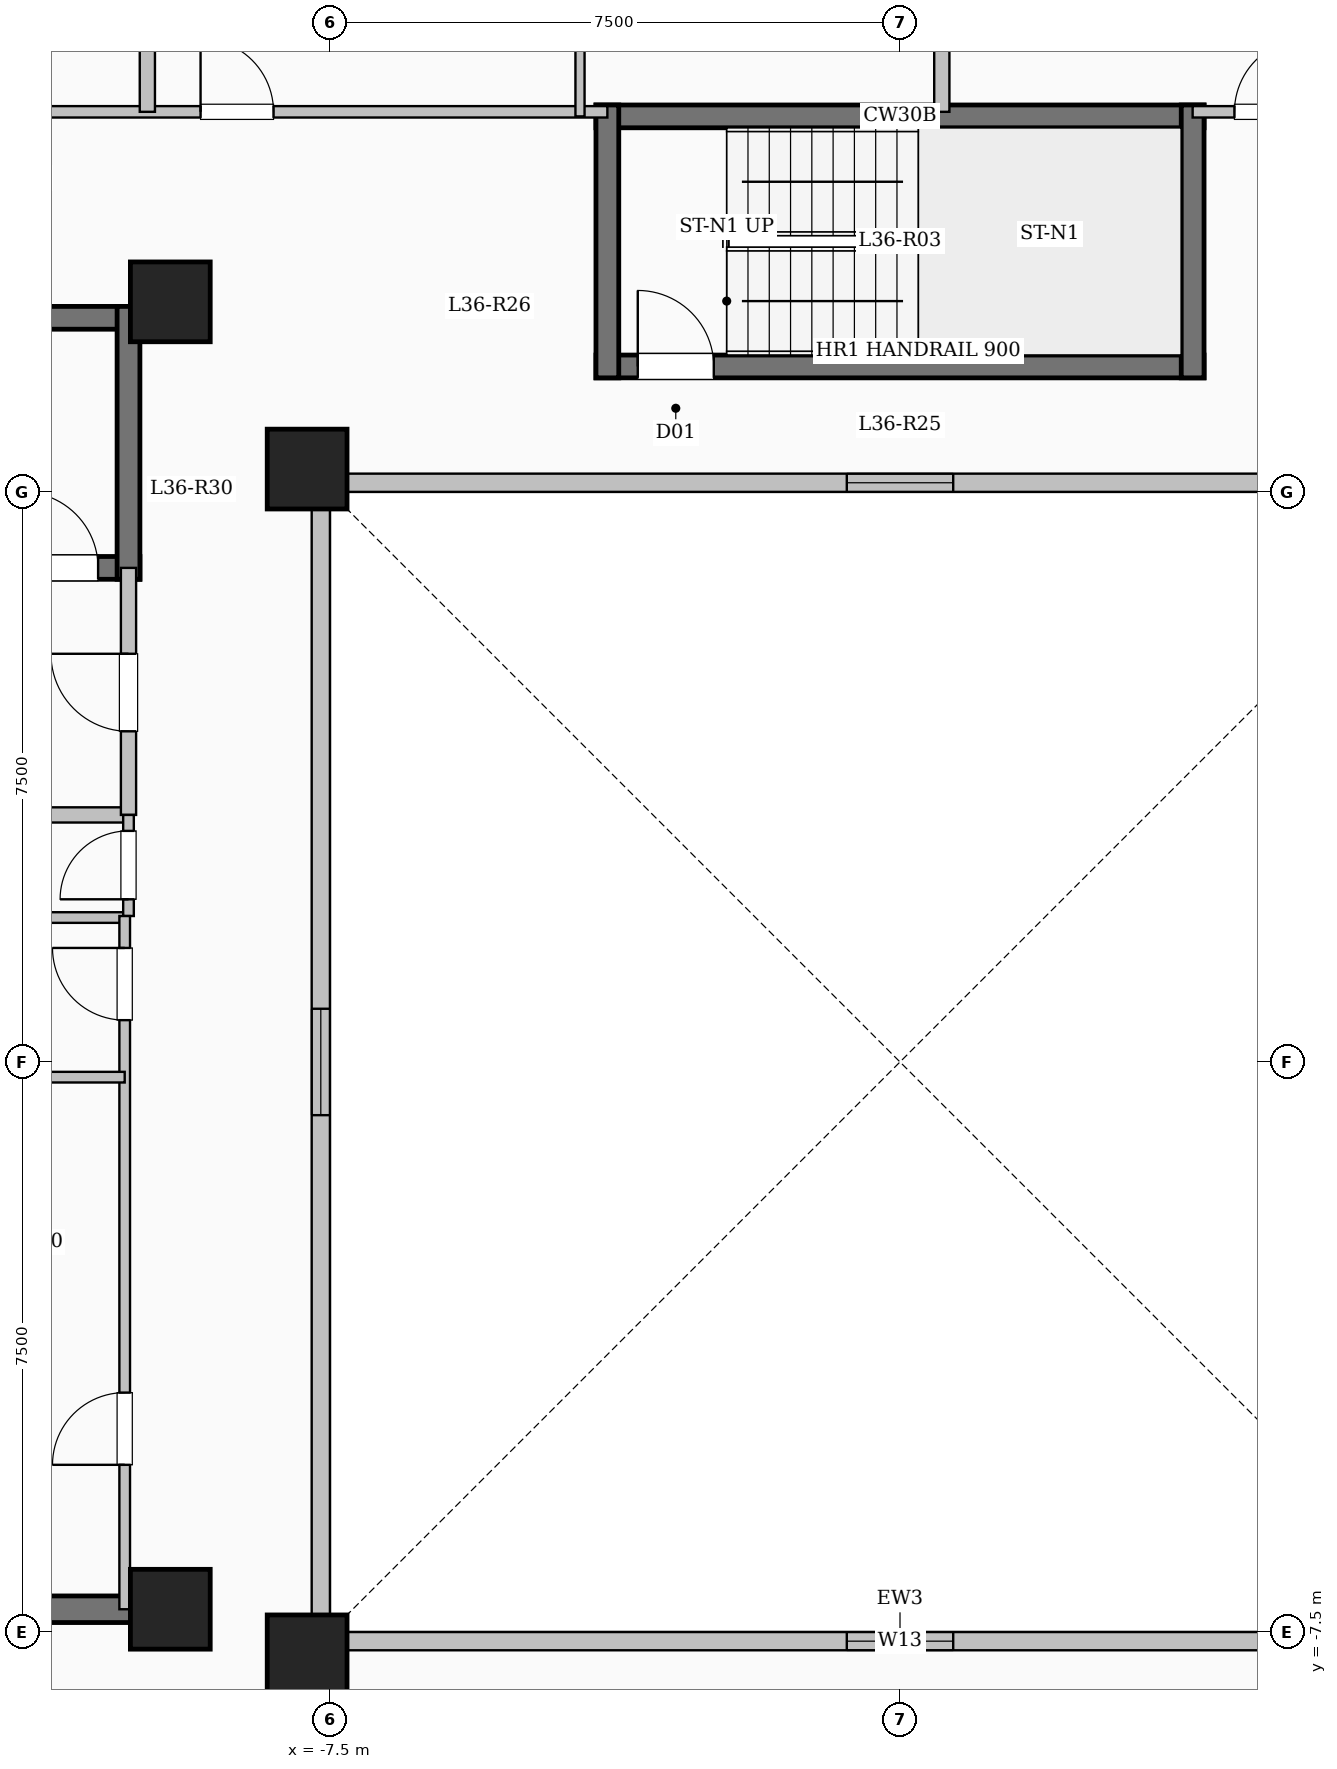
"""IFC4 building model, lengths in metres.
Left out: names, types, materials, properties, quantities, classifications, styles, units other than length and angle.
Written with IfcOpenShell. Run it as: python <this file> out.ifc"""

import sys

from ifc_helpers import new_model, si_unit, direction, frame, frame_2d, origin, origin_2d, place, context, subcontext, project, spatial, rectangle, extrude, element, fill, save


model = new_model("IFC4")
c1 = context("Model", 3, precision=1e-05, world=origin(), true_north=direction((0.0, 1.0)))
c2 = subcontext(c1, "Body", "Model", "MODEL_VIEW")
j1 = project(units=[si_unit("LENGTHUNIT", "METRE"), si_unit("PLANEANGLEUNIT", "RADIAN")], contexts=[c1])
p1 = place(None, origin())
s1 = spatial("IfcSite", under=j1, at=p1, CompositionType="ELEMENT")
p2 = place(p1, origin())
s2 = spatial("IfcBuilding", under=s1, at=p2, CompositionType="ELEMENT")
p3 = place(p2, frame((0.0, 0.0, 135.95)))
s3 = spatial("IfcBuildingStorey", under=s2, at=p3, CompositionType="ELEMENT", Elevation=135.95)
for number, where, z_axis, x_axis in (
    (1, (-7.8, -7.8, 0.0), (0.0, 0.0, 1.0), (1.0, 0.0, 0.0)),
    (2, (-7.8, 7.8, 0.0), (0.0, 0.0, 1.0), (1.0, 0.0, 0.0)),
    (3, (-9.6, -7.2, 0.0), (0.0, 0.0, 1.0), (1.0, 0.0, 0.0)),
    (4, (-9.6, 10.0, 0.0), (0.0, 0.0, 1.0), (1.0, 0.0, 0.0)),
):
    element("IfcColumn", number, at=place(p3, frame(where, z_axis=z_axis, x_axis=x_axis)), inside=s3, PredefinedType="COLUMN", context=c2, shape_type="SweptSolid", body=[
        extrude(rectangle(XDim=1.05, YDim=1.05, at=origin_2d()), origin(), (0.0, 0.0, 1.0), 3.35),
    ])
p4 = place(p3, frame((-7.62, -7.62, 0.0), z_axis=(0.0, 0.0, 1.0), x_axis=(1.0, 0.0, 0.0)))
e5 = element("IfcWall", 5, at=p4, inside=s3, PredefinedType="SOLIDWALL", context=c2, shape_type="SweptSolid", body=[
    extrude(rectangle(XDim=15.24, YDim=0.24, at=frame_2d((7.62, 0.0))), origin(), (0.0, 0.0, 1.0), 3.1),
])
p5 = place(p4, frame((6.92, 0.0, 0.95)))
e6 = element("IfcOpeningElement", 6, at=p5, cuts=e5, PredefinedType="OPENING", context=c2, shape_type="SweptSolid", body=[
    extrude(rectangle(XDim=1.4, YDim=1.5, at=frame_2d((0.7, 0.75))), frame((0.0, 0.13, 0.0), z_axis=(0.0, -1.0, 0.0), x_axis=(1.0, 0.0, 0.0)), (0.0, 0.0, 1.0), 0.26),
])
p6 = place(p3, frame((7.62, 7.62, 0.0), z_axis=(0.0, 0.0, 1.0), x_axis=(-1.0, 0.0, 0.0)))
e7 = element("IfcWall", 7, at=p6, inside=s3, PredefinedType="SOLIDWALL", context=c2, shape_type="SweptSolid", body=[
    extrude(rectangle(XDim=15.24, YDim=0.24, at=frame_2d((7.62, 0.0))), origin(), (0.0, 0.0, 1.0), 3.1),
])
p7 = place(p6, frame((6.92, 0.0, 0.95)))
e8 = element("IfcOpeningElement", 8, at=p7, cuts=e7, PredefinedType="OPENING", context=c2, shape_type="SweptSolid", body=[
    extrude(rectangle(XDim=1.4, YDim=1.5, at=frame_2d((0.7, 0.75))), frame((0.0, 0.13, 0.0), z_axis=(0.0, -1.0, 0.0), x_axis=(1.0, 0.0, 0.0)), (0.0, 0.0, 1.0), 0.26),
])
p8 = place(p3, frame((-7.62, 7.62, 0.0), z_axis=(0.0, 0.0, 1.0), x_axis=(0.0, -1.0, 0.0)))
e9 = element("IfcWall", 9, at=p8, inside=s3, PredefinedType="SOLIDWALL", context=c2, shape_type="SweptSolid", body=[
    extrude(rectangle(XDim=15.24, YDim=0.24, at=frame_2d((7.62, 0.0))), origin(), (0.0, 0.0, 1.0), 3.1),
])
p9 = place(p8, frame((6.92, 0.0, 0.95)))
e10 = element("IfcOpeningElement", 10, at=p9, cuts=e9, PredefinedType="OPENING", context=c2, shape_type="SweptSolid", body=[
    extrude(rectangle(XDim=1.4, YDim=1.5, at=frame_2d((0.7, 0.75))), frame((0.0, 0.13, 0.0), z_axis=(0.0, -1.0, 0.0), x_axis=(1.0, 0.0, 0.0)), (0.0, 0.0, 1.0), 0.26),
])
p10 = place(p3, frame((-18.0, 9.79, 0.0), z_axis=(0.0, 0.0, 1.0), x_axis=(1.0, 0.0, 0.0)))
e11 = element("IfcWall", 11, at=p10, inside=s3, PredefinedType="SHEAR", context=c2, shape_type="SweptSolid", body=[
    extrude(rectangle(XDim=8.0, YDim=0.3, at=frame_2d((4.0, 0.0))), origin(), (0.0, 0.0, 1.0), 3.35),
])
p11 = place(p3, frame((-18.0, 6.5, 0.0), z_axis=(0.0, 0.0, 1.0), x_axis=(1.0, 0.0, 0.0)))
e12 = element("IfcWall", 12, at=p11, inside=s3, PredefinedType="SHEAR", context=c2, shape_type="SweptSolid", body=[
    extrude(rectangle(XDim=8.0, YDim=0.3, at=frame_2d((4.0, 0.0))), origin(), (0.0, 0.0, 1.0), 3.35),
])
p12 = place(p11, frame((6.45, 0.0, 0.0)))
e13 = element("IfcOpeningElement", 13, at=p12, cuts=e12, PredefinedType="OPENING", context=c2, shape_type="SweptSolid", body=[
    extrude(rectangle(XDim=1.0, YDim=2.15, at=frame_2d((0.5, 1.075))), frame((0.0, 0.16, 0.0), z_axis=(0.0, -1.0, 0.0), x_axis=(1.0, 0.0, 0.0)), (0.0, 0.0, 1.0), 0.32),
])
p13 = place(p3, frame((-10.15, 6.35, 0.0), z_axis=(0.0, 0.0, 1.0), x_axis=(0.0, 1.0, 0.0)))
e14 = element("IfcWall", 14, at=p13, inside=s3, PredefinedType="SHEAR", context=c2, shape_type="SweptSolid", body=[
    extrude(rectangle(XDim=3.59, YDim=0.3, at=frame_2d((1.795, 0.0))), origin(), (0.0, 0.0, 1.0), 3.35),
])
p14 = place(p3, frame((-4.0, 12.44, 0.0), z_axis=(0.0, 0.0, 1.0), x_axis=(1.0, 0.0, 0.0)))
e15 = element("IfcWall", 15, at=p14, inside=s3, PredefinedType="SHEAR", context=c2, shape_type="SweptSolid", body=[
    extrude(rectangle(XDim=8.0, YDim=0.3, at=frame_2d((4.0, 0.0))), origin(), (0.0, 0.0, 1.0), 3.35),
])
p15 = place(p3, frame((-4.0, 9.15, 0.0), z_axis=(0.0, 0.0, 1.0), x_axis=(1.0, 0.0, 0.0)))
e16 = element("IfcWall", 16, at=p15, inside=s3, PredefinedType="SHEAR", context=c2, shape_type="SweptSolid", body=[
    extrude(rectangle(XDim=8.0, YDim=0.3, at=frame_2d((4.0, 0.0))), origin(), (0.0, 0.0, 1.0), 3.35),
])
p16 = place(p15, frame((0.55, 0.0, 0.0)))
e17 = element("IfcOpeningElement", 17, at=p16, cuts=e16, PredefinedType="OPENING", context=c2, shape_type="SweptSolid", body=[
    extrude(rectangle(XDim=1.0, YDim=2.15, at=frame_2d((0.5, 1.075))), frame((0.0, 0.16, 0.0), z_axis=(0.0, -1.0, 0.0), x_axis=(1.0, 0.0, 0.0)), (0.0, 0.0, 1.0), 0.32),
])
for number, where, z_axis, x_axis in (
    (18, (-3.85, 9.0, 0.0), (0.0, 0.0, 1.0), (0.0, 1.0, 0.0)),
    (19, (3.85, 9.0, 0.0), (0.0, 0.0, 1.0), (0.0, 1.0, 0.0)),
):
    element("IfcWall", number, at=place(p3, frame(where, z_axis=z_axis, x_axis=x_axis)), inside=s3, PredefinedType="SHEAR", context=c2, shape_type="SweptSolid", body=[
        extrude(rectangle(XDim=3.59, YDim=0.3, at=frame_2d((1.795, 0.0))), origin(), (0.0, 0.0, 1.0), 3.35),
    ])
p17 = place(p3, frame((-15.55, 3.25, 0.0), z_axis=(0.0, 0.0, 1.0), x_axis=(1.0, 0.0, 0.0)))
e20 = element("IfcWall", 20, at=p17, inside=s3, PredefinedType="SOLIDWALL", context=c2, shape_type="SweptSolid", body=[
    extrude(rectangle(XDim=5.4, YDim=0.2, at=frame_2d((2.7, 0.0))), origin(), (0.0, 0.0, 1.0), 3.1),
])
p18 = place(p3, frame((-10.15, 3.25, 0.0), z_axis=(0.0, 0.0, 1.0), x_axis=(0.0, 1.0, 0.0)))
e21 = element("IfcWall", 21, at=p18, inside=s3, PredefinedType="SOLIDWALL", context=c2, shape_type="SweptSolid", body=[
    extrude(rectangle(XDim=3.25, YDim=0.2, at=frame_2d((1.625, 0.0))), origin(), (0.0, 0.0, 1.0), 3.1),
])
p19 = place(p18, frame((1.1, 0.0, 0.0)))
e22 = element("IfcOpeningElement", 22, at=p19, cuts=e21, PredefinedType="OPENING", context=c2, shape_type="SweptSolid", body=[
    extrude(rectangle(XDim=1.02, YDim=2.15, at=frame_2d((0.51, 1.075))), frame((0.0, 0.11, 0.0), z_axis=(0.0, -1.0, 0.0), x_axis=(1.0, 0.0, 0.0)), (0.0, 0.0, 1.0), 0.22),
])
p20 = place(p3, frame((-18.625, -7.2, 0.0), z_axis=(0.0, 0.0, 1.0), x_axis=(1.0, 0.0, 0.0)))
e23 = element("IfcWall", 23, at=p20, inside=s3, PredefinedType="SHEAR", context=c2, shape_type="SweptSolid", body=[
    extrude(rectangle(XDim=8.55, YDim=0.35, at=frame_2d((4.275, 0.0))), origin(), (0.0, 0.0, 1.0), 3.35),
])
p21 = place(p3, frame((-12.95, 1.9, 0.0), z_axis=(0.0, 0.0, 1.0), x_axis=(1.0, 0.0, 0.0)))
e24 = element("IfcWall", 24, at=p21, inside=s3, PredefinedType="PARTITIONING", context=c2, shape_type="SweptSolid", body=[
    extrude(rectangle(XDim=2.8, YDim=0.14, at=frame_2d((1.4, 0.0))), origin(), (0.0, 0.0, 1.0), 3.1),
])
p22 = place(p3, frame((-10.15, 1.92, 0.0), z_axis=(0.0, 0.0, 1.0), x_axis=(0.0, 1.0, 0.0)))
e25 = element("IfcWall", 25, at=p22, inside=s3, PredefinedType="PARTITIONING", context=c2, shape_type="SweptSolid", body=[
    extrude(rectangle(XDim=1.33, YDim=0.14, at=frame_2d((0.665, 0.0))), origin(), (0.0, 0.0, 1.0), 3.1),
])
p23 = place(p22, frame((0.22, 0.0, 0.0)))
e26 = element("IfcOpeningElement", 26, at=p23, cuts=e25, PredefinedType="OPENING", context=c2, shape_type="SweptSolid", body=[
    extrude(rectangle(XDim=0.9, YDim=2.08, at=frame_2d((0.45, 1.04))), frame((0.0, 0.08, 0.0), z_axis=(0.0, -1.0, 0.0), x_axis=(1.0, 0.0, 0.0)), (0.0, 0.0, 1.0), 0.16),
])
p24 = place(p3, frame((-10.2, -7.2, 0.0), z_axis=(0.0, 0.0, 1.0), x_axis=(0.0, 1.0, 0.0)))
e27 = element("IfcWall", 27, at=p24, inside=s3, PredefinedType="PARTITIONING", context=c2, shape_type="SweptSolid", body=[
    extrude(rectangle(XDim=9.12, YDim=0.14, at=frame_2d((4.56, 0.0))), origin(), (0.0, 0.0, 1.0), 3.1),
])
p25 = place(p24, frame((1.9, 0.0, 0.0)))
e28 = element("IfcOpeningElement", 28, at=p25, cuts=e27, PredefinedType="OPENING", context=c2, shape_type="SweptSolid", body=[
    extrude(rectangle(XDim=0.95, YDim=2.12, at=frame_2d((0.475, 1.06))), frame((0.0, 0.08, 0.0), z_axis=(0.0, -1.0, 0.0), x_axis=(1.0, 0.0, 0.0)), (0.0, 0.0, 1.0), 0.16),
])
p26 = place(p24, frame((7.75, 0.0, 0.0)))
e29 = element("IfcOpeningElement", 29, at=p26, cuts=e27, PredefinedType="OPENING", context=c2, shape_type="SweptSolid", body=[
    extrude(rectangle(XDim=0.95, YDim=2.12, at=frame_2d((0.475, 1.06))), frame((0.0, 0.08, 0.0), z_axis=(0.0, -1.0, 0.0), x_axis=(1.0, 0.0, 0.0)), (0.0, 0.0, 1.0), 0.16),
])
p27 = place(p3, frame((-12.9, -0.2, 0.0), z_axis=(0.0, 0.0, 1.0), x_axis=(1.0, 0.0, 0.0)))
e30 = element("IfcWall", 30, at=p27, inside=s3, PredefinedType="PARTITIONING", context=c2, shape_type="SweptSolid", body=[
    extrude(rectangle(XDim=2.7, YDim=0.14, at=frame_2d((1.35, 0.0))), origin(), (0.0, 0.0, 1.0), 3.1),
])
p28 = place(p3, frame((-19.55, 12.5, 0.0), z_axis=(0.0, 0.0, 1.0), x_axis=(1.0, 0.0, 0.0)))
e31 = element("IfcWall", 31, at=p28, inside=s3, PredefinedType="PARTITIONING", context=c2, shape_type="SweptSolid", body=[
    extrude(rectangle(XDim=15.7, YDim=0.15, at=frame_2d((7.85, 0.0))), origin(), (0.0, 0.0, 1.0), 3.1),
])
p29 = place(p28, frame((0.7, 0.0, 0.0)))
e32 = element("IfcOpeningElement", 32, at=p29, cuts=e31, PredefinedType="OPENING", context=c2, shape_type="SweptSolid", body=[
    extrude(rectangle(XDim=0.96, YDim=2.15, at=frame_2d((0.48, 1.075))), frame((0.0, 0.085, 0.0), z_axis=(0.0, -1.0, 0.0), x_axis=(1.0, 0.0, 0.0)), (0.0, 0.0, 1.0), 0.17),
])
p30 = place(p28, frame((10.348, 0.0, 0.0)))
e33 = element("IfcOpeningElement", 33, at=p30, cuts=e31, PredefinedType="OPENING", context=c2, shape_type="SweptSolid", body=[
    extrude(rectangle(XDim=0.96, YDim=2.15, at=frame_2d((0.48, 1.075))), frame((0.0, 0.085, 0.0), z_axis=(0.0, -1.0, 0.0), x_axis=(1.0, 0.0, 0.0)), (0.0, 0.0, 1.0), 0.17),
])
p31 = place(p3, frame((3.85, 12.5, 0.0), z_axis=(0.0, 0.0, 1.0), x_axis=(1.0, 0.0, 0.0)))
e34 = element("IfcWall", 34, at=p31, inside=s3, PredefinedType="PARTITIONING", context=c2, shape_type="SweptSolid", body=[
    extrude(rectangle(XDim=15.7, YDim=0.15, at=frame_2d((7.85, 0.0))), origin(), (0.0, 0.0, 1.0), 3.1),
])
p32 = place(p31, frame((0.55, 0.0, 0.0)))
e35 = element("IfcOpeningElement", 35, at=p32, cuts=e34, PredefinedType="OPENING", context=c2, shape_type="SweptSolid", body=[
    extrude(rectangle(XDim=0.96, YDim=2.15, at=frame_2d((0.48, 1.075))), frame((0.0, 0.085, 0.0), z_axis=(0.0, -1.0, 0.0), x_axis=(1.0, 0.0, 0.0)), (0.0, 0.0, 1.0), 0.17),
])
p33 = place(p31, frame((7.28, 0.0, 0.0)))
e36 = element("IfcOpeningElement", 36, at=p33, cuts=e34, PredefinedType="OPENING", context=c2, shape_type="SweptSolid", body=[
    extrude(rectangle(XDim=0.96, YDim=2.15, at=frame_2d((0.48, 1.075))), frame((0.0, 0.085, 0.0), z_axis=(0.0, -1.0, 0.0), x_axis=(1.0, 0.0, 0.0)), (0.0, 0.0, 1.0), 0.17),
])
p34 = place(p3, frame((0.55, 12.5, 0.0), z_axis=(0.0, 0.0, 1.0), x_axis=(0.0, 1.0, 0.0)))
e37 = element("IfcWall", 37, at=p34, inside=s3, PredefinedType="SOLIDWALL", context=c2, shape_type="SweptSolid", body=[
    extrude(rectangle(XDim=10.18, YDim=0.2, at=frame_2d((5.09, 0.0))), origin(), (0.0, 0.0, 1.0), 3.1),
])
p35 = place(p3, frame((-9.902, 12.5, 0.0), z_axis=(0.0, 0.0, 1.0), x_axis=(0.0, 1.0, 0.0)))
e38 = element("IfcWall", 38, at=p35, inside=s3, PredefinedType="SOLIDWALL", context=c2, shape_type="SweptSolid", body=[
    extrude(rectangle(XDim=8.971, YDim=0.2, at=frame_2d((4.485, 0.0))), origin(), (0.0, 0.0, 1.0), 3.1),
])
p36 = place(p3, frame((-4.21, 12.44, 0.0), z_axis=(0.0, 0.0, 1.0), x_axis=(0.0, 1.0, 0.0)))
e39 = element("IfcWall", 39, at=p36, inside=s3, PredefinedType="PARTITIONING", context=c2, shape_type="SweptSolid", body=[
    extrude(rectangle(XDim=3.21, YDim=0.12, at=frame_2d((1.605, 0.0))), origin(), (0.0, 0.0, 1.0), 3.1),
])
p37 = place(p36, frame((1.195, 0.0, 0.0)))
e40 = element("IfcOpeningElement", 40, at=p37, cuts=e39, PredefinedType="OPENING", context=c2, shape_type="SweptSolid", body=[
    extrude(rectangle(XDim=0.88, YDim=2.1, at=frame_2d((0.44, 1.05))), frame((0.0, 0.07, 0.0), z_axis=(0.0, -1.0, 0.0), x_axis=(1.0, 0.0, 0.0)), (0.0, 0.0, 1.0), 0.14),
])
p38 = place(p5, origin())
e41 = element("IfcWindow", 41, at=p38, inside=s3, PartitioningType="SINGLE_PANEL", PredefinedType="WINDOW", context=c2, shape_type="SweptSolid", body=[
    extrude(rectangle(XDim=1.4, YDim=1.5, at=frame_2d((0.7, 0.75))), frame((0.0, 0.03, 0.0), z_axis=(0.0, -1.0, 0.0), x_axis=(1.0, 0.0, 0.0)), (0.0, 0.0, 1.0), 0.06),
])
fill(e6, e41)
p39 = place(p7, origin())
e42 = element("IfcWindow", 42, at=p39, inside=s3, PartitioningType="SINGLE_PANEL", PredefinedType="WINDOW", context=c2, shape_type="SweptSolid", body=[
    extrude(rectangle(XDim=1.4, YDim=1.5, at=frame_2d((0.7, 0.75))), frame((0.0, 0.03, 0.0), z_axis=(0.0, -1.0, 0.0), x_axis=(1.0, 0.0, 0.0)), (0.0, 0.0, 1.0), 0.06),
])
fill(e8, e42)
p40 = place(p9, origin())
e43 = element("IfcWindow", 43, at=p40, inside=s3, PartitioningType="SINGLE_PANEL", PredefinedType="WINDOW", context=c2, shape_type="SweptSolid", body=[
    extrude(rectangle(XDim=1.4, YDim=1.5, at=frame_2d((0.7, 0.75))), frame((0.0, 0.03, 0.0), z_axis=(0.0, -1.0, 0.0), x_axis=(1.0, 0.0, 0.0)), (0.0, 0.0, 1.0), 0.06),
])
fill(e10, e43)
p41 = place(p12, origin())
e44 = element("IfcDoor", 44, at=p41, inside=s3, OperationType="SINGLE_SWING_LEFT", PredefinedType="DOOR", context=c2, shape_type="SweptSolid", body=[
    extrude(rectangle(XDim=1.0, YDim=2.15, at=frame_2d((0.5, 1.075))), frame((0.0, 0.025, 0.0), z_axis=(0.0, -1.0, 0.0), x_axis=(1.0, 0.0, 0.0)), (0.0, 0.0, 1.0), 0.05),
])
fill(e13, e44)
p42 = place(p16, origin())
e45 = element("IfcDoor", 45, at=p42, inside=s3, OperationType="SINGLE_SWING_LEFT", PredefinedType="DOOR", context=c2, shape_type="SweptSolid", body=[
    extrude(rectangle(XDim=1.0, YDim=2.15, at=frame_2d((0.5, 1.075))), frame((0.0, 0.025, 0.0), z_axis=(0.0, -1.0, 0.0), x_axis=(1.0, 0.0, 0.0)), (0.0, 0.0, 1.0), 0.05),
])
fill(e17, e45)
p43 = place(p19, origin())
e46 = element("IfcDoor", 46, at=p43, inside=s3, OperationType="SINGLE_SWING_RIGHT", PredefinedType="DOOR", context=c2, shape_type="SweptSolid", body=[
    extrude(rectangle(XDim=1.02, YDim=2.15, at=frame_2d((0.51, 1.075))), frame((0.0, 0.025, 0.0), z_axis=(0.0, -1.0, 0.0), x_axis=(1.0, 0.0, 0.0)), (0.0, 0.0, 1.0), 0.05),
])
fill(e22, e46)
p44 = place(p23, origin())
e47 = element("IfcDoor", 47, at=p44, inside=s3, OperationType="SINGLE_SWING_LEFT", PredefinedType="DOOR", context=c2, shape_type="SweptSolid", body=[
    extrude(rectangle(XDim=0.9, YDim=2.08, at=frame_2d((0.45, 1.04))), frame((0.0, 0.025, 0.0), z_axis=(0.0, -1.0, 0.0), x_axis=(1.0, 0.0, 0.0)), (0.0, 0.0, 1.0), 0.05),
])
fill(e26, e47)
p45 = place(p25, origin())
e48 = element("IfcDoor", 48, at=p45, inside=s3, OperationType="SINGLE_SWING_LEFT", PredefinedType="DOOR", context=c2, shape_type="SweptSolid", body=[
    extrude(rectangle(XDim=0.95, YDim=2.12, at=frame_2d((0.475, 1.06))), frame((0.0, 0.025, 0.0), z_axis=(0.0, -1.0, 0.0), x_axis=(1.0, 0.0, 0.0)), (0.0, 0.0, 1.0), 0.05),
])
fill(e28, e48)
p46 = place(p26, origin())
e49 = element("IfcDoor", 49, at=p46, inside=s3, OperationType="SINGLE_SWING_RIGHT", PredefinedType="DOOR", context=c2, shape_type="SweptSolid", body=[
    extrude(rectangle(XDim=0.95, YDim=2.12, at=frame_2d((0.475, 1.06))), frame((0.0, 0.025, 0.0), z_axis=(0.0, -1.0, 0.0), x_axis=(1.0, 0.0, 0.0)), (0.0, 0.0, 1.0), 0.05),
])
fill(e29, e49)
p47 = place(p30, origin())
e50 = element("IfcDoor", 50, at=p47, inside=s3, OperationType="SINGLE_SWING_LEFT", PredefinedType="DOOR", context=c2, shape_type="SweptSolid", body=[
    extrude(rectangle(XDim=0.96, YDim=2.15, at=frame_2d((0.48, 1.075))), frame((0.0, 0.025, 0.0), z_axis=(0.0, -1.0, 0.0), x_axis=(1.0, 0.0, 0.0)), (0.0, 0.0, 1.0), 0.05),
])
fill(e33, e50)
p48 = place(p32, origin())
e51 = element("IfcDoor", 51, at=p48, inside=s3, OperationType="SINGLE_SWING_RIGHT", PredefinedType="DOOR", context=c2, shape_type="SweptSolid", body=[
    extrude(rectangle(XDim=0.96, YDim=2.15, at=frame_2d((0.48, 1.075))), frame((0.0, 0.025, 0.0), z_axis=(0.0, -1.0, 0.0), x_axis=(1.0, 0.0, 0.0)), (0.0, 0.0, 1.0), 0.05),
])
fill(e35, e51)
save(model, sys.argv[1])
